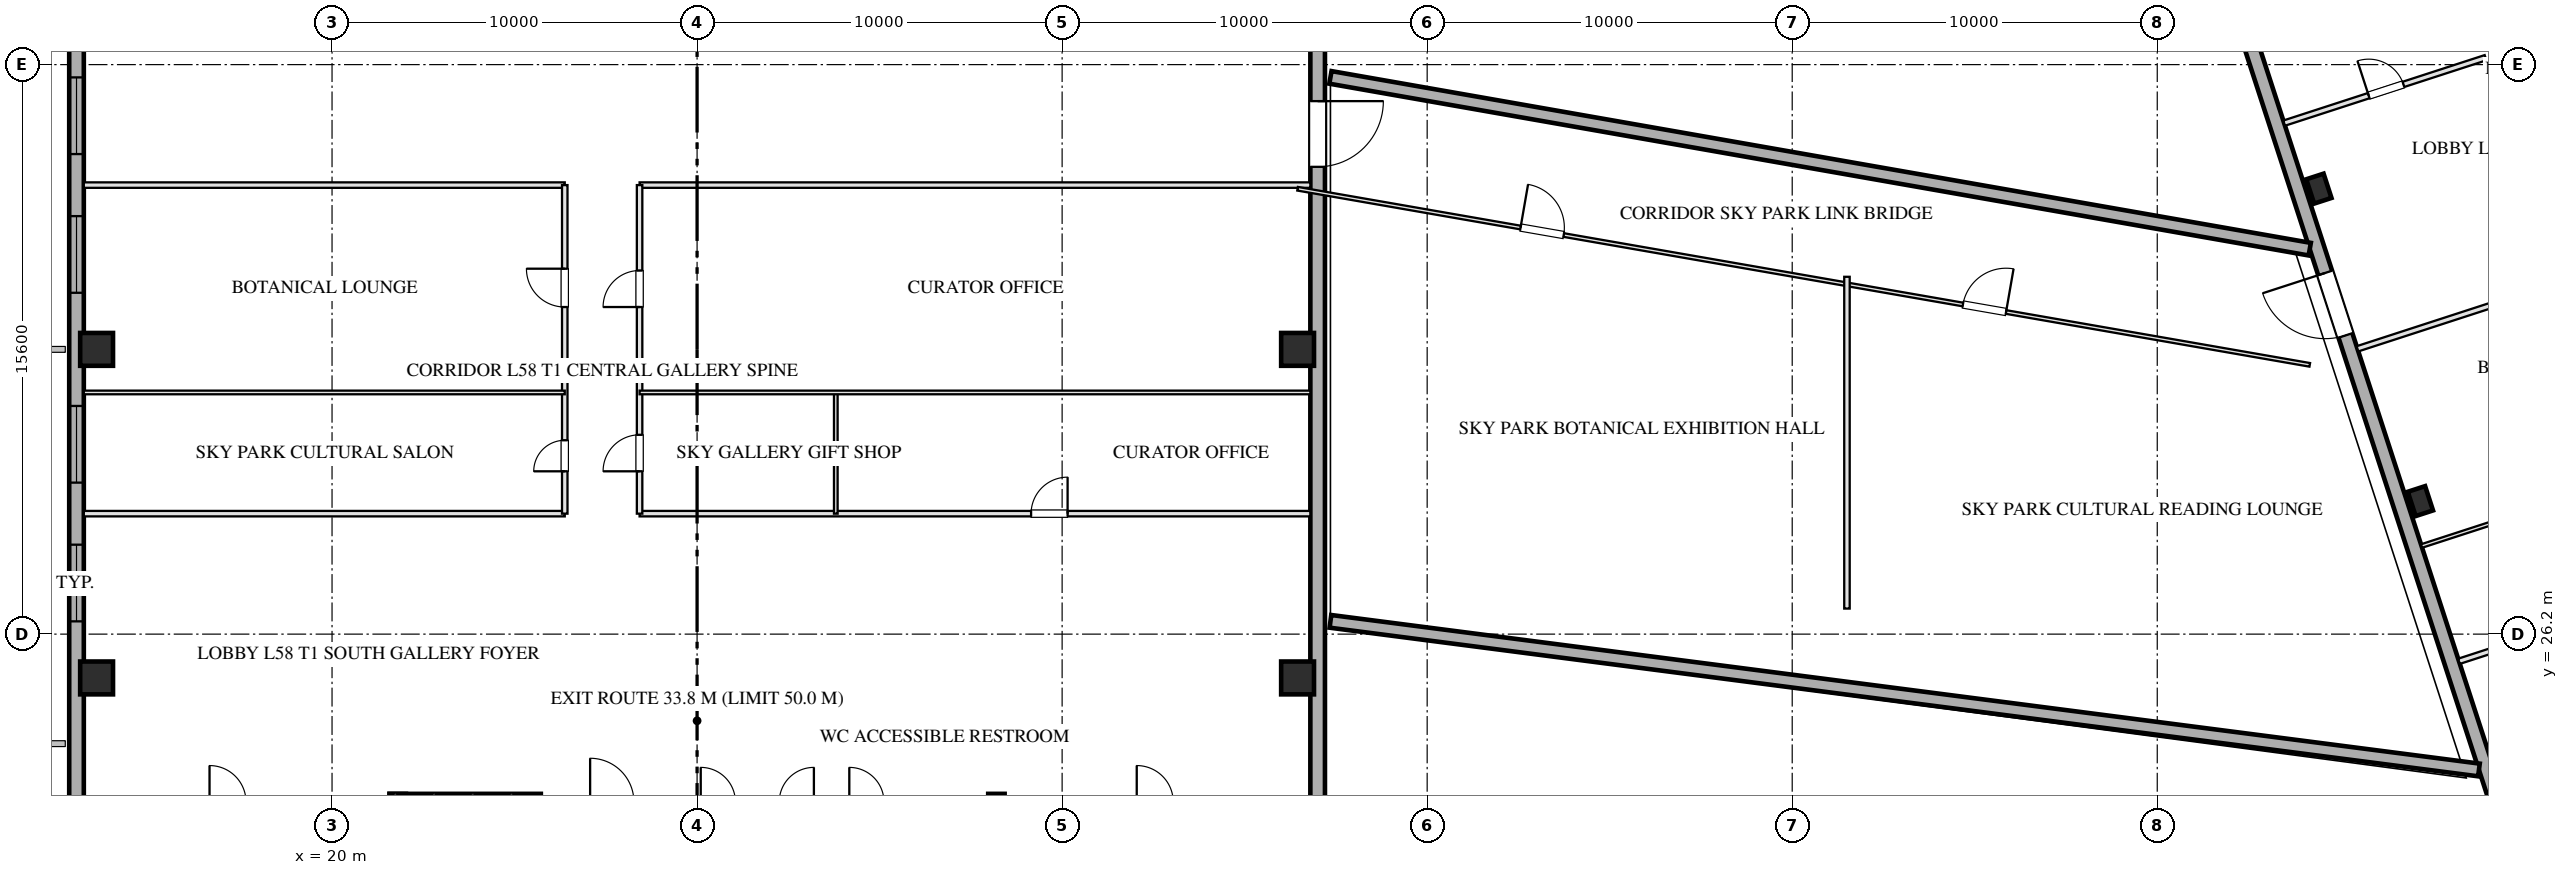
"""IFC4 building model, lengths in metres.
Left out: names, types, materials, properties, quantities, classifications, styles, units other than length and angle.
Written with IfcOpenShell. Run it as: python <this file> out.ifc"""

import sys

from ifc_helpers import new_model, si_unit, direction, frame, frame_2d, origin, origin_2d, place, context, subcontext, project, spatial, rectangle, hollow_rectangle, extrude, element, fill, save


model = new_model("IFC4")
c1 = context("Model", 3, precision=1e-05, world=origin(), true_north=direction((0.0, 1.0)))
c2 = subcontext(c1, "Body", "Model", "MODEL_VIEW")
j1 = project(units=[si_unit("LENGTHUNIT", "METRE"), si_unit("PLANEANGLEUNIT", "RADIAN")], contexts=[c1])
p1 = place(None, origin())
s1 = spatial("IfcSite", under=j1, at=p1, CompositionType="ELEMENT")
p2 = place(p1, origin())
s2 = spatial("IfcBuilding", under=s1, at=p2, CompositionType="ELEMENT")
p3 = place(p2, frame((0.0, 0.0, 216.2)))
s3 = spatial("IfcBuildingStorey", under=s2, at=p3, CompositionType="ELEMENT", Elevation=216.2)
for number, where, z_axis, x_axis in (
    (1, (21.8, 21.825, 0.0), (0.0, 0.0, 1.0), (0.0, -1.0, 0.0)),
    (2, (38.2, 21.825, 0.0), (0.0, 0.0, 1.0), (0.0, -1.0, 0.0)),
):
    element("IfcWall", number, at=place(p3, frame(where, z_axis=z_axis, x_axis=x_axis)), inside=s3, PredefinedType="SHEAR", context=c2, shape_type="SweptSolid", body=[
        extrude(rectangle(XDim=9.33, YDim=0.45, at=frame_2d((4.665, 0.0))), origin(), (0.0, 0.0, 1.0), 3.45),
    ])
p4 = place(p3, frame((21.575, 21.6, 0.0), z_axis=(0.0, 0.0, 1.0), x_axis=(1.0, 0.0, 0.0)))
e3 = element("IfcWall", 3, at=p4, inside=s3, PredefinedType="SHEAR", context=c2, shape_type="SweptSolid", body=[
    extrude(rectangle(XDim=4.145, YDim=0.45, at=frame_2d((2.073, 0.0))), origin(), (0.0, 0.0, 1.0), 3.45),
])
p5 = place(p3, frame((79.442, 41.899, 0.0), z_axis=(0.0, 0.0, 1.0), x_axis=(-0.309035778627, 0.951050412717, 0.0)))
e4 = element("IfcWall", 4, at=p5, inside=s3, PredefinedType="SHEAR", context=c2, shape_type="SweptSolid", body=[
    extrude(rectangle(XDim=9.33, YDim=0.45, at=frame_2d((4.665, 0.0))), origin(), (0.0, 0.0, 1.0), 3.45),
])
for number, where, z_axis, x_axis in (
    (5, (13.55, 25.0, 0.0), (0.0, 0.0, 1.0), (1.0, 0.0, 0.0)),
    (6, (13.55, 34.0, 0.0), (0.0, 0.0, 1.0), (1.0, 0.0, 0.0)),
    (7, (46.45, 25.0, 0.0), (0.0, 0.0, 1.0), (1.0, 0.0, 0.0)),
    (8, (46.45, 34.0, 0.0), (0.0, 0.0, 1.0), (1.0, 0.0, 0.0)),
):
    element("IfcColumn", number, at=place(p3, frame(where, z_axis=z_axis, x_axis=x_axis)), inside=s3, PredefinedType="COLUMN", context=c2, shape_type="SweptSolid", body=[
        extrude(hollow_rectangle(XDim=0.9, YDim=0.9, WallThickness=0.032, at=origin_2d()), origin(), (0.0, 0.0, 1.0), 3.451),
    ])
for number, where, z_axis, x_axis in (
    (9, (77.208, 29.844, 0.0), (0.0, 0.0, 1.0), (0.951, 0.309, 0.0)),
    (10, (74.427, 38.403, 0.0), (0.0, 0.0, 1.0), (0.951, 0.309, 0.0)),
):
    element("IfcColumn", number, at=place(p3, frame(where, z_axis=z_axis, x_axis=x_axis)), inside=s3, PredefinedType="COLUMN", context=c2, shape_type="SweptSolid", body=[
        extrude(hollow_rectangle(XDim=0.5, YDim=0.7, WallThickness=0.025, at=origin_2d()), origin(), (0.0, 0.0, 1.0), 3.451),
    ])
p6 = place(p3, frame((13.0, 10.8, 0.0), z_axis=(0.0, 0.0, 1.0), x_axis=(0.0, 1.0, 0.0)))
e11 = element("IfcWall", 11, at=p6, inside=s3, PredefinedType="SOLIDWALL", context=c2, shape_type="SweptSolid", body=[
    extrude(rectangle(XDim=46.4, YDim=0.4, at=frame_2d((23.2, 0.0))), origin(), (0.0, 0.0, 1.0), 2.55),
])
p7 = place(p6, frame((15.75, 0.0, 0.75)))
e12 = element("IfcOpeningElement", 12, at=p7, cuts=e11, PredefinedType="OPENING", context=c2, shape_type="SweptSolid", body=[
    extrude(rectangle(XDim=2.1, YDim=1.4, at=frame_2d((1.05, 0.7))), frame((0.0, 0.21, 0.0), z_axis=(0.0, -1.0, 0.0), x_axis=(1.0, 0.0, 0.0)), (0.0, 0.0, 1.0), 0.42),
])
p8 = place(p6, frame((19.55, 0.0, 0.75)))
e13 = element("IfcOpeningElement", 13, at=p8, cuts=e11, PredefinedType="OPENING", context=c2, shape_type="SweptSolid", body=[
    extrude(rectangle(XDim=2.1, YDim=1.4, at=frame_2d((1.05, 0.7))), frame((0.0, 0.21, 0.0), z_axis=(0.0, -1.0, 0.0), x_axis=(1.0, 0.0, 0.0)), (0.0, 0.0, 1.0), 0.42),
])
p9 = place(p6, frame((24.75, 0.0, 0.75)))
e14 = element("IfcOpeningElement", 14, at=p9, cuts=e11, PredefinedType="OPENING", context=c2, shape_type="SweptSolid", body=[
    extrude(rectangle(XDim=2.1, YDim=1.4, at=frame_2d((1.05, 0.7))), frame((0.0, 0.21, 0.0), z_axis=(0.0, -1.0, 0.0), x_axis=(1.0, 0.0, 0.0)), (0.0, 0.0, 1.0), 0.42),
])
p10 = place(p6, frame((28.55, 0.0, 0.75)))
e15 = element("IfcOpeningElement", 15, at=p10, cuts=e11, PredefinedType="OPENING", context=c2, shape_type="SweptSolid", body=[
    extrude(rectangle(XDim=2.1, YDim=1.4, at=frame_2d((1.05, 0.7))), frame((0.0, 0.21, 0.0), z_axis=(0.0, -1.0, 0.0), x_axis=(1.0, 0.0, 0.0)), (0.0, 0.0, 1.0), 0.42),
])
p11 = place(p3, frame((47.0, 57.2, 0.0), z_axis=(0.0, 0.0, 1.0), x_axis=(0.0, -1.0, 0.0)))
e16 = element("IfcWall", 16, at=p11, inside=s3, PredefinedType="SOLIDWALL", context=c2, shape_type="SweptSolid", body=[
    extrude(rectangle(XDim=46.4, YDim=0.4, at=frame_2d((23.2, 0.0))), origin(), (0.0, 0.0, 1.0), 2.55),
])
p12 = place(p11, frame((16.4, 0.0, 0.0)))
e17 = element("IfcOpeningElement", 17, at=p12, cuts=e16, PredefinedType="OPENING", context=c2, shape_type="SweptSolid", body=[
    extrude(rectangle(XDim=1.8, YDim=2.2, at=frame_2d((0.9, 1.1))), frame((0.0, 0.21, 0.0), z_axis=(0.0, -1.0, 0.0), x_axis=(1.0, 0.0, 0.0)), (0.0, 0.0, 1.0), 0.42),
])
p13 = place(p3, frame((82.618, 11.414, 0.0), z_axis=(0.0, 0.0, 1.0), x_axis=(-0.309016491071, 0.951056679828, 0.0)))
e18 = element("IfcWall", 18, at=p13, inside=s3, PredefinedType="SOLIDWALL", context=c2, shape_type="SweptSolid", body=[
    extrude(rectangle(XDim=38.4, YDim=0.4, at=frame_2d((19.2, 0.0))), origin(), (0.0, 0.0, 1.0), 2.55),
])
p14 = place(p13, frame((24.15, 0.0, 0.0)))
e19 = element("IfcOpeningElement", 19, at=p14, cuts=e18, PredefinedType="OPENING", context=c2, shape_type="SweptSolid", body=[
    extrude(rectangle(XDim=1.8, YDim=2.2, at=frame_2d((0.9, 1.1))), frame((0.0, 0.21, 0.0), z_axis=(0.0, -1.0, 0.0), x_axis=(1.0, 0.0, 0.0)), (0.0, 0.0, 1.0), 0.42),
])
p15 = place(p3, frame((47.35, 26.55, 0.0), z_axis=(0.0, 0.0, 1.0), x_axis=(0.991732402874, -0.128323189996, 0.0)))
e20 = element("IfcWall", 20, at=p15, inside=s3, PredefinedType="SOLIDWALL", context=c2, shape_type="SweptSolid", body=[
    extrude(rectangle(XDim=31.725, YDim=0.35, at=frame_2d((15.862, 0.0))), origin(), (0.0, 0.0, 1.0), 3.15),
])
p16 = place(p3, frame((74.177, 36.745, 0.0), z_axis=(0.0, 0.0, 1.0), x_axis=(-0.984966283934, 0.172746691759, 0.0)))
e21 = element("IfcWall", 21, at=p16, inside=s3, PredefinedType="SOLIDWALL", context=c2, shape_type="SweptSolid", body=[
    extrude(rectangle(XDim=27.237, YDim=0.35, at=frame_2d((13.618, 0.0))), origin(), (0.0, 0.0, 1.0), 3.15),
])
p17 = place(p3, frame((13.2, 29.5, 0.0), z_axis=(0.0, 0.0, 1.0), x_axis=(1.0, 0.0, 0.0)))
e22 = element("IfcWall", 22, at=p17, inside=s3, PredefinedType="PARTITIONING", context=c2, shape_type="SweptSolid", body=[
    extrude(rectangle(XDim=13.175, YDim=0.15, at=frame_2d((6.587, 0.0))), origin(), (0.0, 0.0, 1.0), 3.155),
])
p18 = place(p3, frame((28.425, 29.5, 0.0), z_axis=(0.0, 0.0, 1.0), x_axis=(1.0, 0.0, 0.0)))
e23 = element("IfcWall", 23, at=p18, inside=s3, PredefinedType="PARTITIONING", context=c2, shape_type="SweptSolid", body=[
    extrude(rectangle(XDim=18.375, YDim=0.15, at=frame_2d((9.188, 0.0))), origin(), (0.0, 0.0, 1.0), 3.155),
])
p19 = place(p18, frame((10.725, 0.0, 0.0)))
e24 = element("IfcOpeningElement", 24, at=p19, cuts=e23, PredefinedType="OPENING", context=c2, shape_type="SweptSolid", body=[
    extrude(rectangle(XDim=1.0, YDim=2.05, at=frame_2d((0.5, 1.025))), frame((0.0, 0.085, 0.0), z_axis=(0.0, -1.0, 0.0), x_axis=(1.0, 0.0, 0.0)), (0.0, 0.0, 1.0), 0.17),
])
p20 = place(p3, frame((13.2, 38.5, 0.0), z_axis=(0.0, 0.0, 1.0), x_axis=(1.0, 0.0, 0.0)))
e25 = element("IfcWall", 25, at=p20, inside=s3, PredefinedType="PARTITIONING", context=c2, shape_type="SweptSolid", body=[
    extrude(rectangle(XDim=13.175, YDim=0.15, at=frame_2d((6.587, 0.0))), origin(), (0.0, 0.0, 1.0), 3.155),
])
p21 = place(p3, frame((28.425, 38.5, 0.0), z_axis=(0.0, 0.0, 1.0), x_axis=(1.0, 0.0, 0.0)))
e26 = element("IfcWall", 26, at=p21, inside=s3, PredefinedType="PARTITIONING", context=c2, shape_type="SweptSolid", body=[
    extrude(rectangle(XDim=18.375, YDim=0.15, at=frame_2d((9.188, 0.0))), origin(), (0.0, 0.0, 1.0), 3.155),
])
p22 = place(p3, frame((26.375, 29.5, 0.0), z_axis=(0.0, 0.0, 1.0), x_axis=(0.0, 1.0, 0.0)))
e27 = element("IfcWall", 27, at=p22, inside=s3, PredefinedType="PARTITIONING", context=c2, shape_type="SweptSolid", body=[
    extrude(rectangle(XDim=9.0, YDim=0.15, at=frame_2d((4.5, 0.0))), origin(), (0.0, 0.0, 1.0), 3.155),
])
p23 = place(p22, frame((1.16, 0.0, 0.0)))
e28 = element("IfcOpeningElement", 28, at=p23, cuts=e27, PredefinedType="OPENING", context=c2, shape_type="SweptSolid", body=[
    extrude(rectangle(XDim=0.85, YDim=2.05, at=frame_2d((0.425, 1.025))), frame((0.0, 0.085, 0.0), z_axis=(0.0, -1.0, 0.0), x_axis=(1.0, 0.0, 0.0)), (0.0, 0.0, 1.0), 0.17),
])
p24 = place(p22, frame((5.66, 0.0, 0.0)))
e29 = element("IfcOpeningElement", 29, at=p24, cuts=e27, PredefinedType="OPENING", context=c2, shape_type="SweptSolid", body=[
    extrude(rectangle(XDim=1.05, YDim=2.05, at=frame_2d((0.525, 1.025))), frame((0.0, 0.085, 0.0), z_axis=(0.0, -1.0, 0.0), x_axis=(1.0, 0.0, 0.0)), (0.0, 0.0, 1.0), 0.17),
])
p25 = place(p3, frame((28.425, 29.5, 0.0), z_axis=(0.0, 0.0, 1.0), x_axis=(0.0, 1.0, 0.0)))
e30 = element("IfcWall", 30, at=p25, inside=s3, PredefinedType="PARTITIONING", context=c2, shape_type="SweptSolid", body=[
    extrude(rectangle(XDim=9.0, YDim=0.15, at=frame_2d((4.5, 0.0))), origin(), (0.0, 0.0, 1.0), 3.155),
])
p26 = place(p25, frame((1.16, 0.0, 0.0)))
e31 = element("IfcOpeningElement", 31, at=p26, cuts=e30, PredefinedType="OPENING", context=c2, shape_type="SweptSolid", body=[
    extrude(rectangle(XDim=1.0, YDim=2.05, at=frame_2d((0.5, 1.025))), frame((0.0, 0.085, 0.0), z_axis=(0.0, -1.0, 0.0), x_axis=(1.0, 0.0, 0.0)), (0.0, 0.0, 1.0), 0.17),
])
p27 = place(p25, frame((5.66, 0.0, 0.0)))
e32 = element("IfcOpeningElement", 32, at=p27, cuts=e30, PredefinedType="OPENING", context=c2, shape_type="SweptSolid", body=[
    extrude(rectangle(XDim=1.0, YDim=2.05, at=frame_2d((0.5, 1.025))), frame((0.0, 0.085, 0.0), z_axis=(0.0, -1.0, 0.0), x_axis=(1.0, 0.0, 0.0)), (0.0, 0.0, 1.0), 0.17),
])
p28 = place(p3, frame((13.2, 32.82, 0.0), z_axis=(0.0, 0.0, 1.0), x_axis=(1.0, 0.0, 0.0)))
e33 = element("IfcWall", 33, at=p28, inside=s3, PredefinedType="MOVABLE", context=c2, shape_type="SweptSolid", body=[
    extrude(rectangle(XDim=13.175, YDim=0.1, at=frame_2d((6.587, 0.0))), origin(), (0.0, 0.0, 1.0), 3.155),
])
p29 = place(p3, frame((33.8, 29.5, 0.0), z_axis=(0.0, 0.0, 1.0), x_axis=(0.0, 1.0, 0.0)))
e34 = element("IfcWall", 34, at=p29, inside=s3, PredefinedType="MOVABLE", context=c2, shape_type="SweptSolid", body=[
    extrude(rectangle(XDim=3.32, YDim=0.1, at=frame_2d((1.66, 0.0))), origin(), (0.0, 0.0, 1.0), 3.155),
])
p30 = place(p3, frame((28.425, 32.82, 0.0), z_axis=(0.0, 0.0, 1.0), x_axis=(1.0, 0.0, 0.0)))
e35 = element("IfcWall", 35, at=p30, inside=s3, PredefinedType="MOVABLE", context=c2, shape_type="SweptSolid", body=[
    extrude(rectangle(XDim=18.375, YDim=0.1, at=frame_2d((9.188, 0.0))), origin(), (0.0, 0.0, 1.0), 3.155),
])
p31 = place(p3, frame((73.476, 40.197, 0.0), z_axis=(0.0, 0.0, 1.0), x_axis=(0.951059431056, 0.309008023519, 0.0)))
e36 = element("IfcWall", 36, at=p31, inside=s3, PredefinedType="PARTITIONING", context=c2, shape_type="SweptSolid", body=[
    extrude(rectangle(XDim=5.8, YDim=0.15, at=frame_2d((2.9, 0.0))), origin(), (0.0, 0.0, 1.0), 3.155),
])
p32 = place(p31, frame((2.436, 0.0, 0.0)))
e37 = element("IfcOpeningElement", 37, at=p32, cuts=e36, PredefinedType="OPENING", context=c2, shape_type="SweptSolid", body=[
    extrude(rectangle(XDim=1.0, YDim=2.05, at=frame_2d((0.5, 1.025))), frame((0.0, 0.085, 0.0), z_axis=(0.0, -1.0, 0.0), x_axis=(1.0, 0.0, 0.0)), (0.0, 0.0, 1.0), 0.17),
])
for number, where, z_axis, x_axis in (
    (38, (78.266, 25.456, 0.0), (0.0, 0.0, 1.0), (0.951, 0.309, 0.0)),
    (39, (75.485, 34.015, 0.0), (0.0, 0.0, 1.0), (0.951, 0.309, 0.0)),
):
    element("IfcWall", number, at=place(p3, frame(where, z_axis=z_axis, x_axis=x_axis)), inside=s3, PredefinedType="PARTITIONING", context=c2, shape_type="SweptSolid", body=[
        extrude(rectangle(XDim=10.175, YDim=0.15, at=frame_2d((5.087, 0.0))), origin(), (0.0, 0.0, 1.0), 3.155),
    ])
p33 = place(p3, frame((77.24, 28.613, 0.0), z_axis=(0.0, 0.0, 1.0), x_axis=(0.951055402118, 0.30902042344, 0.0)))
e40 = element("IfcWall", 40, at=p33, inside=s3, PredefinedType="MOVABLE", context=c2, shape_type="SweptSolid", body=[
    extrude(rectangle(XDim=10.175, YDim=0.1, at=frame_2d((5.087, 0.0))), origin(), (0.0, 0.0, 1.0), 3.155),
])
p34 = place(p3, frame((46.45, 38.4, 0.0), z_axis=(0.0, 0.0, 1.0), x_axis=(0.985202712742, -0.171393158571, 0.0)))
e41 = element("IfcWall", 41, at=p34, inside=s3, PredefinedType="MOVABLE", context=c2, shape_type="SweptSolid", body=[
    extrude(rectangle(XDim=28.144, YDim=0.1, at=frame_2d((14.072, 0.0))), origin(), (0.0, 0.0, 1.0), 3.155),
])
p35 = place(p34, frame((6.2, 0.0, 0.0)))
e42 = element("IfcOpeningElement", 42, at=p35, cuts=e41, PredefinedType="OPENING", context=c2, shape_type="SweptSolid", body=[
    extrude(rectangle(XDim=1.2, YDim=2.05, at=frame_2d((0.6, 1.025))), frame((0.0, 0.06, 0.0), z_axis=(0.0, -1.0, 0.0), x_axis=(1.0, 0.0, 0.0)), (0.0, 0.0, 1.0), 0.12),
])
p36 = place(p34, frame((18.5, 0.0, 0.0)))
e43 = element("IfcOpeningElement", 43, at=p36, cuts=e41, PredefinedType="OPENING", context=c2, shape_type="SweptSolid", body=[
    extrude(rectangle(XDim=1.2, YDim=2.05, at=frame_2d((0.6, 1.025))), frame((0.0, 0.06, 0.0), z_axis=(0.0, -1.0, 0.0), x_axis=(1.0, 0.0, 0.0)), (0.0, 0.0, 1.0), 0.12),
])
p37 = place(p3, frame((61.5, 26.9, 0.0), z_axis=(0.0, 0.0, 1.0), x_axis=(0.0, 1.0, 0.0)))
e44 = element("IfcWall", 44, at=p37, inside=s3, PredefinedType="PARTITIONING", context=c2, shape_type="SweptSolid", body=[
    extrude(rectangle(XDim=9.088, YDim=0.15, at=frame_2d((4.544, 0.0))), origin(), (0.0, 0.0, 1.0), 3.155),
])
p38 = place(p7, origin())
e45 = element("IfcWindow", 45, at=p38, inside=s3, PartitioningType="TRIPLE_PANEL_VERTICAL", PredefinedType="WINDOW", context=c2, shape_type="SweptSolid", body=[
    extrude(rectangle(XDim=2.1, YDim=1.4, at=frame_2d((1.05, 0.7))), frame((0.0, 0.03, 0.0), z_axis=(0.0, -1.0, 0.0), x_axis=(1.0, 0.0, 0.0)), (0.0, 0.0, 1.0), 0.06),
])
fill(e12, e45)
p39 = place(p8, origin())
e46 = element("IfcWindow", 46, at=p39, inside=s3, PartitioningType="TRIPLE_PANEL_VERTICAL", PredefinedType="WINDOW", context=c2, shape_type="SweptSolid", body=[
    extrude(rectangle(XDim=2.1, YDim=1.4, at=frame_2d((1.05, 0.7))), frame((0.0, 0.03, 0.0), z_axis=(0.0, -1.0, 0.0), x_axis=(1.0, 0.0, 0.0)), (0.0, 0.0, 1.0), 0.06),
])
fill(e13, e46)
p40 = place(p9, origin())
e47 = element("IfcWindow", 47, at=p40, inside=s3, PartitioningType="TRIPLE_PANEL_VERTICAL", PredefinedType="WINDOW", context=c2, shape_type="SweptSolid", body=[
    extrude(rectangle(XDim=2.1, YDim=1.4, at=frame_2d((1.05, 0.7))), frame((0.0, 0.03, 0.0), z_axis=(0.0, -1.0, 0.0), x_axis=(1.0, 0.0, 0.0)), (0.0, 0.0, 1.0), 0.06),
])
fill(e14, e47)
p41 = place(p10, origin())
e48 = element("IfcWindow", 48, at=p41, inside=s3, PartitioningType="TRIPLE_PANEL_VERTICAL", PredefinedType="WINDOW", context=c2, shape_type="SweptSolid", body=[
    extrude(rectangle(XDim=2.1, YDim=1.4, at=frame_2d((1.05, 0.7))), frame((0.0, 0.03, 0.0), z_axis=(0.0, -1.0, 0.0), x_axis=(1.0, 0.0, 0.0)), (0.0, 0.0, 1.0), 0.06),
])
fill(e15, e48)
p42 = place(p12, origin())
e49 = element("IfcDoor", 49, at=p42, inside=s3, OperationType="SINGLE_SWING_LEFT", PredefinedType="DOOR", context=c2, shape_type="SweptSolid", body=[
    extrude(rectangle(XDim=1.8, YDim=2.2, at=frame_2d((0.9, 1.1))), frame((0.0, 0.025, 0.0), z_axis=(0.0, -1.0, 0.0), x_axis=(1.0, 0.0, 0.0)), (0.0, 0.0, 1.0), 0.05),
])
fill(e17, e49)
p43 = place(p14, origin())
e50 = element("IfcDoor", 50, at=p43, inside=s3, OperationType="SINGLE_SWING_RIGHT", PredefinedType="DOOR", context=c2, shape_type="SweptSolid", body=[
    extrude(rectangle(XDim=1.8, YDim=2.2, at=frame_2d((0.9, 1.1))), frame((0.0, 0.025, 0.0), z_axis=(0.0, -1.0, 0.0), x_axis=(1.0, 0.0, 0.0)), (0.0, 0.0, 1.0), 0.05),
])
fill(e19, e50)
p44 = place(p19, origin())
e51 = element("IfcDoor", 51, at=p44, inside=s3, OperationType="SINGLE_SWING_RIGHT", PredefinedType="DOOR", context=c2, shape_type="SweptSolid", body=[
    extrude(rectangle(XDim=1.0, YDim=2.05, at=frame_2d((0.5, 1.025))), frame((0.0, 0.025, 0.0), z_axis=(0.0, -1.0, 0.0), x_axis=(1.0, 0.0, 0.0)), (0.0, 0.0, 1.0), 0.05),
])
fill(e24, e51)
p45 = place(p23, origin())
e52 = element("IfcDoor", 52, at=p45, inside=s3, OperationType="SINGLE_SWING_LEFT", PredefinedType="DOOR", context=c2, shape_type="SweptSolid", body=[
    extrude(rectangle(XDim=0.85, YDim=2.05, at=frame_2d((0.425, 1.025))), frame((0.0, 0.025, 0.0), z_axis=(0.0, -1.0, 0.0), x_axis=(1.0, 0.0, 0.0)), (0.0, 0.0, 1.0), 0.05),
])
fill(e28, e52)
p46 = place(p24, origin())
e53 = element("IfcDoor", 53, at=p46, inside=s3, OperationType="SINGLE_SWING_RIGHT", PredefinedType="DOOR", context=c2, shape_type="SweptSolid", body=[
    extrude(rectangle(XDim=1.05, YDim=2.05, at=frame_2d((0.525, 1.025))), frame((0.0, 0.025, 0.0), z_axis=(0.0, -1.0, 0.0), x_axis=(1.0, 0.0, 0.0)), (0.0, 0.0, 1.0), 0.05),
])
fill(e29, e53)
p47 = place(p26, origin())
e54 = element("IfcDoor", 54, at=p47, inside=s3, OperationType="SINGLE_SWING_LEFT", PredefinedType="DOOR", context=c2, shape_type="SweptSolid", body=[
    extrude(rectangle(XDim=1.0, YDim=2.05, at=frame_2d((0.5, 1.025))), frame((0.0, 0.025, 0.0), z_axis=(0.0, -1.0, 0.0), x_axis=(1.0, 0.0, 0.0)), (0.0, 0.0, 1.0), 0.05),
])
fill(e31, e54)
p48 = place(p27, origin())
e55 = element("IfcDoor", 55, at=p48, inside=s3, OperationType="SINGLE_SWING_LEFT", PredefinedType="DOOR", context=c2, shape_type="SweptSolid", body=[
    extrude(rectangle(XDim=1.0, YDim=2.05, at=frame_2d((0.5, 1.025))), frame((0.0, 0.025, 0.0), z_axis=(0.0, -1.0, 0.0), x_axis=(1.0, 0.0, 0.0)), (0.0, 0.0, 1.0), 0.05),
])
fill(e32, e55)
p49 = place(p32, origin())
e56 = element("IfcDoor", 56, at=p49, inside=s3, OperationType="SINGLE_SWING_LEFT", PredefinedType="DOOR", context=c2, shape_type="SweptSolid", body=[
    extrude(rectangle(XDim=1.0, YDim=2.05, at=frame_2d((0.5, 1.025))), frame((0.0, 0.025, 0.0), z_axis=(0.0, -1.0, 0.0), x_axis=(1.0, 0.0, 0.0)), (0.0, 0.0, 1.0), 0.05),
])
fill(e37, e56)
p50 = place(p35, origin())
e57 = element("IfcDoor", 57, at=p50, inside=s3, OperationType="SINGLE_SWING_LEFT", PredefinedType="DOOR", context=c2, shape_type="SweptSolid", body=[
    extrude(rectangle(XDim=1.2, YDim=2.05, at=frame_2d((0.6, 1.025))), frame((0.0, 0.025, 0.0), z_axis=(0.0, -1.0, 0.0), x_axis=(1.0, 0.0, 0.0)), (0.0, 0.0, 1.0), 0.05),
])
fill(e42, e57)
p51 = place(p36, origin())
e58 = element("IfcDoor", 58, at=p51, inside=s3, OperationType="SINGLE_SWING_RIGHT", PredefinedType="DOOR", context=c2, shape_type="SweptSolid", body=[
    extrude(rectangle(XDim=1.2, YDim=2.05, at=frame_2d((0.6, 1.025))), frame((0.0, 0.025, 0.0), z_axis=(0.0, -1.0, 0.0), x_axis=(1.0, 0.0, 0.0)), (0.0, 0.0, 1.0), 0.05),
])
fill(e43, e58)
save(model, sys.argv[1])
